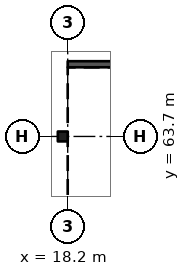
"""IFC4 building model, lengths in metres.
Left out: names, types, materials, properties, quantities, classifications, styles, units other than length and angle.
Written with IfcOpenShell. Run it as: python <this file> out.ifc"""

import sys

from ifc_helpers import new_model, si_unit, direction, frame, frame_2d, origin, origin_2d, place, context, subcontext, project, spatial, rectangle, extrude, element, save


model = new_model("IFC4")
c1 = context("Model", 3, precision=1e-05, world=origin(), true_north=direction((0.0, 1.0)))
c2 = subcontext(c1, "Body", "Model", "MODEL_VIEW")
j1 = project(units=[si_unit("LENGTHUNIT", "METRE"), si_unit("PLANEANGLEUNIT", "RADIAN")], contexts=[c1])
p1 = place(None, origin())
s1 = spatial("IfcSite", under=j1, at=p1, CompositionType="ELEMENT")
p2 = place(p1, origin())
s2 = spatial("IfcBuilding", under=s1, at=p2, CompositionType="ELEMENT")
p3 = place(p2, frame((0.0, 0.0, 6.37)))
s3 = spatial("IfcBuildingStorey", under=s2, at=p3, CompositionType="ELEMENT", Elevation=6.37)
p4 = place(p3, frame((17.875, 63.7, 0.0), z_axis=(0.0, 0.0, 1.0), x_axis=(1.0, 0.0, 0.0)))
e1 = element("IfcColumn", 1, at=p4, inside=s3, PredefinedType="COLUMN", context=c2, shape_type="SweptSolid", body=[
    extrude(rectangle(XDim=0.65, YDim=0.65, at=origin_2d()), origin(), (0.0, 0.0, 1.0), 4.55),
])
p5 = place(p3, frame((40.95, 68.45, 0.0), z_axis=(0.0, 0.0, 1.0), x_axis=(-1.0, 0.0, 0.0)))
e2 = element("IfcWall", 2, at=p5, inside=s3, PredefinedType="SHEAR", context=c2, shape_type="SweptSolid", body=[
    extrude(rectangle(XDim=22.75, YDim=0.4, at=frame_2d((11.375, 0.0))), origin(), (0.0, 0.0, 1.0), 4.55),
])
save(model, sys.argv[1])
